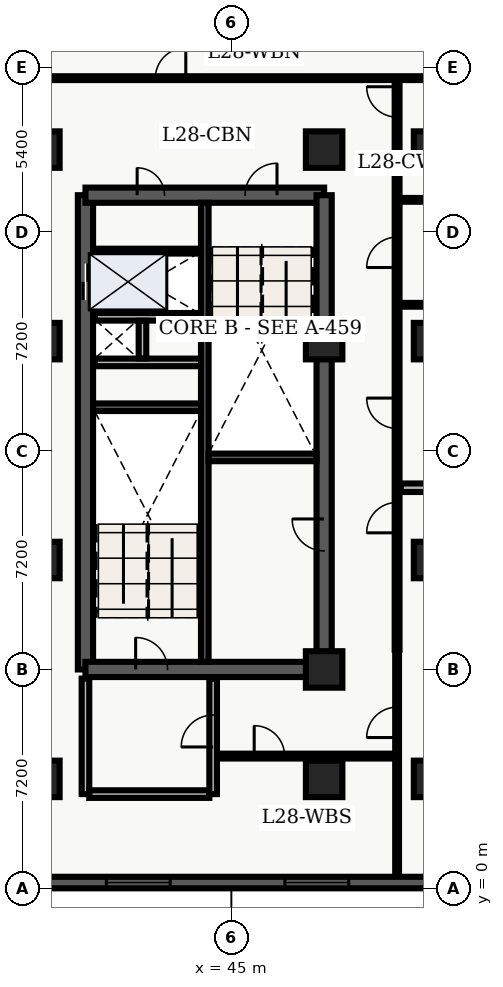
"""IFC4 building model, lengths in metres.
Left out: names, types, materials, properties, quantities, classifications, styles, units other than length and angle.
Written with IfcOpenShell. Run it as: python <this file> out.ifc"""

import sys

from ifc_helpers import new_model, entity, si_unit, converted_unit, direction, frame, origin_with_axes, origin_2d_with_axis, place, context, subcontext, project, spatial, polyline, rectangle, outline, extrude, element, fill, save


model = new_model("IFC4")
c1 = context("Model", 3, precision=1e-05, world=origin_with_axes(), true_north=direction((0.0, 1.0)))
c2 = subcontext(c1, "Body", "Model", "MODEL_VIEW")
j1 = project(units=[si_unit("LENGTHUNIT", "METRE"), converted_unit("PLANEANGLEUNIT", "DEGREE", entity("IfcPlaneAngleMeasure", 0.017), si_unit("PLANEANGLEUNIT", "RADIAN"), dimensions=[0, 0, 0, 0, 0, 0, 0])], contexts=[c1])
p1 = place(None, origin_with_axes())
s1 = spatial("IfcSite", under=j1, at=p1, CompositionType="ELEMENT")
p2 = place(p1, origin_with_axes())
s2 = spatial("IfcBuilding", under=s1, at=p2, CompositionType="ELEMENT")
p3 = place(p2, frame((0.0, 0.0, 116.4), z_axis=(0.0, 0.0, 1.0), x_axis=(1.0, 0.0, 0.0)))
s3 = spatial("IfcBuildingStorey", under=s2, at=p3, CompositionType="ELEMENT", Elevation=116.4)
p4 = place(p3, frame((40.2, 7.2, 0.0), z_axis=(0.0, 0.0, 1.0), x_axis=(0.0, 1.0, 0.0)))
e1 = element("IfcWall", 1, at=p4, inside=s3, PredefinedType="SHEAR", context=c2, shape_type="SweptSolid", body=[
    extrude(outline(polyline([(0.0, -0.25), (15.6, -0.25), (15.6, 0.25), (0.0, 0.25), (0.0, -0.25)])), origin_with_axes(), (0.0, 0.0, 1.0), 3.66),
])
p5 = place(p4, frame((12.75, 0.0, 0.0), z_axis=(0.0, 0.0, 1.0), x_axis=(1.0, 0.0, 0.0)))
e2 = element("IfcOpeningElement", 2, at=p5, cuts=e1, PredefinedType="OPENING", context=c2, shape_type="SweptSolid", body=[
    extrude(rectangle(XDim=1.2, YDim=0.52, at=origin_2d_with_axis()), origin_with_axes(), (0.0, 0.0, 1.0), 2.15),
])
p6 = place(p3, frame((40.2, 7.2, 0.0), z_axis=(0.0, 0.0, 1.0), x_axis=(1.0, 0.0, 0.0)))
e3 = element("IfcWall", 3, at=p6, inside=s3, PredefinedType="SHEAR", context=c2, shape_type="SweptSolid", body=[
    extrude(outline(polyline([(0.0, -0.25), (7.85, -0.25), (7.85, 0.25), (0.0, 0.25), (0.0, -0.25)])), origin_with_axes(), (0.0, 0.0, 1.0), 3.66),
])
p7 = place(p6, frame((2.175, 0.0, 0.0), z_axis=(0.0, 0.0, 1.0), x_axis=(1.0, 0.0, 0.0)))
e4 = element("IfcOpeningElement", 4, at=p7, cuts=e3, PredefinedType="OPENING", context=c2, shape_type="SweptSolid", body=[
    extrude(rectangle(XDim=1.05, YDim=0.52, at=origin_2d_with_axis()), origin_with_axes(), (0.0, 0.0, 1.0), 2.15),
])
p8 = place(p3, frame((40.2, 22.8, 0.0), z_axis=(0.0, 0.0, 1.0), x_axis=(1.0, 0.0, 0.0)))
e5 = element("IfcWall", 5, at=p8, inside=s3, PredefinedType="SHEAR", context=c2, shape_type="SweptSolid", body=[
    extrude(outline(polyline([(0.0, -0.25), (7.85, -0.25), (7.85, 0.25), (0.0, 0.25), (0.0, -0.25)])), origin_with_axes(), (0.0, 0.0, 1.0), 3.66),
])
p9 = place(p8, frame((5.775, 0.0, 0.0), z_axis=(0.0, 0.0, 1.0), x_axis=(1.0, 0.0, 0.0)))
e6 = element("IfcOpeningElement", 6, at=p9, cuts=e5, PredefinedType="OPENING", context=c2, shape_type="SweptSolid", body=[
    extrude(rectangle(XDim=1.05, YDim=0.52, at=origin_2d_with_axis()), origin_with_axes(), (0.0, 0.0, 1.0), 2.15),
])
p10 = place(p8, frame((2.15, 0.0, 0.0), z_axis=(0.0, 0.0, 1.0), x_axis=(1.0, 0.0, 0.0)))
e7 = element("IfcOpeningElement", 7, at=p10, cuts=e5, PredefinedType="OPENING", context=c2, shape_type="SweptSolid", body=[
    extrude(rectangle(XDim=0.9, YDim=0.52, at=origin_2d_with_axis()), origin_with_axes(), (0.0, 0.0, 1.0), 2.15),
])
p11 = place(p3, frame((48.05, 7.2, 0.0), z_axis=(0.0, 0.0, 1.0), x_axis=(0.0, 1.0, 0.0)))
e8 = element("IfcWall", 8, at=p11, inside=s3, PredefinedType="SHEAR", context=c2, shape_type="SweptSolid", body=[
    extrude(outline(polyline([(0.0, -0.25), (15.6, -0.25), (15.6, 0.25), (0.0, 0.25), (0.0, -0.25)])), origin_with_axes(), (0.0, 0.0, 1.0), 3.66),
])
p12 = place(p11, frame((4.425, 0.0, 0.0), z_axis=(0.0, 0.0, 1.0), x_axis=(1.0, 0.0, 0.0)))
e9 = element("IfcOpeningElement", 9, at=p12, cuts=e8, PredefinedType="OPENING", context=c2, shape_type="SweptSolid", body=[
    extrude(rectangle(XDim=1.05, YDim=0.52, at=origin_2d_with_axis()), origin_with_axes(), (0.0, 0.0, 1.0), 2.15),
])
p13 = place(p3, frame((44.125, 7.45, 0.0), z_axis=(0.0, 0.0, 1.0), x_axis=(0.0, 1.0, 0.0)))
e10 = element("IfcWall", 10, at=p13, inside=s3, PredefinedType="SHEAR", context=c2, shape_type="SweptSolid", body=[
    extrude(outline(polyline([(0.0, -0.125), (15.1, -0.125), (15.1, 0.125), (0.0, 0.125), (0.0, -0.125)])), origin_with_axes(), (0.0, 0.0, 1.0), 3.66),
])
for number, where, z_axis, x_axis in (
    (11, (40.45, 15.825, 0.0), (0.0, 0.0, 1.0), (1.0, 0.0, 0.0)),
    (12, (44.25, 14.175, 0.0), (0.0, 0.0, 1.0), (1.0, 0.0, 0.0)),
):
    element("IfcWall", number, at=place(p3, frame(where, z_axis=z_axis, x_axis=x_axis)), inside=s3, PredefinedType="SHEAR", context=c2, shape_type="SweptSolid", body=[
        extrude(outline(polyline([(0.0, -0.125), (3.55, -0.125), (3.55, 0.125), (0.0, 0.125), (0.0, -0.125)])), origin_with_axes(), (0.0, 0.0, 1.0), 3.66),
    ])
for number, where, z_axis, x_axis in (
    (13, (40.5, 17.3, 0.0), (0.0, 0.0, 1.0), (1.0, 0.0, 0.0)),
    (14, (40.5, 18.8, 0.0), (0.0, 0.0, 1.0), (1.0, 0.0, 0.0)),
):
    element("IfcWall", number, at=place(p3, frame(where, z_axis=z_axis, x_axis=x_axis)), inside=s3, PredefinedType="SOLIDWALL", context=c2, shape_type="SweptSolid", body=[
        extrude(outline(polyline([(0.0, -0.125), (3.5, -0.125), (3.5, 0.125), (0.0, 0.125), (0.0, -0.125)])), origin_with_axes(), (0.0, 0.0, 1.0), 2.7),
    ])
p14 = place(p3, frame((42.075, 17.43, 0.0), z_axis=(0.0, 0.0, 1.0), x_axis=(0.0, 1.0, 0.0)))
e15 = element("IfcWall", 15, at=p14, inside=s3, PredefinedType="SOLIDWALL", context=c2, shape_type="SweptSolid", body=[
    extrude(outline(polyline([(0.0, -0.125), (1.24, -0.125), (1.24, 0.125), (0.0, 0.125), (0.0, -0.125)])), origin_with_axes(), (0.0, 0.0, 1.0), 2.7),
])
p15 = place(p3, frame((40.2, 3.1, 0.0), z_axis=(0.0, 0.0, 1.0), x_axis=(0.0, 1.0, 0.0)))
e16 = element("IfcWall", 16, at=p15, inside=s3, PredefinedType="SOLIDWALL", context=c2, shape_type="SweptSolid", body=[
    extrude(outline(polyline([(0.0, -0.125), (3.8, -0.125), (3.8, 0.125), (0.0, 0.125), (0.0, -0.125)])), origin_with_axes(), (0.0, 0.0, 1.0), 2.7),
])
p16 = place(p3, frame((40.325, 3.1, 0.0), z_axis=(0.0, 0.0, 1.0), x_axis=(1.0, 0.0, 0.0)))
e17 = element("IfcWall", 17, at=p16, inside=s3, PredefinedType="SOLIDWALL", context=c2, shape_type="SweptSolid", body=[
    extrude(outline(polyline([(0.0, -0.125), (3.95, -0.125), (3.95, 0.125), (0.0, 0.125), (0.0, -0.125)])), origin_with_axes(), (0.0, 0.0, 1.0), 2.7),
])
p17 = place(p3, frame((44.4, 3.1, 0.0), z_axis=(0.0, 0.0, 1.0), x_axis=(0.0, 1.0, 0.0)))
e18 = element("IfcWall", 18, at=p17, inside=s3, PredefinedType="SOLIDWALL", context=c2, shape_type="SweptSolid", body=[
    extrude(outline(polyline([(0.0, -0.125), (3.8, -0.125), (3.8, 0.125), (0.0, 0.125), (0.0, -0.125)])), origin_with_axes(), (0.0, 0.0, 1.0), 2.7),
])
p18 = place(p17, frame((2.075, 0.0, 0.0), z_axis=(0.0, 0.0, 1.0), x_axis=(1.0, 0.0, 0.0)))
e19 = element("IfcOpeningElement", 19, at=p18, cuts=e18, PredefinedType="OPENING", context=c2, shape_type="SweptSolid", body=[
    extrude(rectangle(XDim=1.05, YDim=0.27, at=origin_2d_with_axis()), origin_with_axes(), (0.0, 0.0, 1.0), 2.15),
])
for number, where, z_axis, x_axis in (
    (20, (38.75, 3.6, 0.0), (0.0, 0.0, 1.0), (1.0, 0.0, 0.0)),
    (21, (38.75, 10.8, 0.0), (0.0, 0.0, 1.0), (1.0, 0.0, 0.0)),
    (22, (38.75, 18.0, 0.0), (0.0, 0.0, 1.0), (1.0, 0.0, 0.0)),
    (23, (38.75, 24.3, 0.0), (0.0, 0.0, 1.0), (1.0, 0.0, 0.0)),
    (24, (48.05, 3.6, 0.0), (0.0, 0.0, 1.0), (1.0, 0.0, 0.0)),
    (25, (48.05, 7.2, 0.0), (0.0, 0.0, 1.0), (1.0, 0.0, 0.0)),
    (26, (48.05, 18.0, 0.0), (0.0, 0.0, 1.0), (1.0, 0.0, 0.0)),
    (27, (48.05, 24.3, 0.0), (0.0, 0.0, 1.0), (1.0, 0.0, 0.0)),
    (28, (51.6, 3.6, 0.0), (0.0, 0.0, 1.0), (1.0, 0.0, 0.0)),
    (29, (51.6, 10.8, 0.0), (0.0, 0.0, 1.0), (1.0, 0.0, 0.0)),
    (30, (51.6, 18.0, 0.0), (0.0, 0.0, 1.0), (1.0, 0.0, 0.0)),
    (31, (51.6, 24.3, 0.0), (0.0, 0.0, 1.0), (1.0, 0.0, 0.0)),
):
    element("IfcColumn", number, at=place(p3, frame(where, z_axis=z_axis, x_axis=x_axis)), inside=s3, PredefinedType="COLUMN", context=c2, shape_type="SweptSolid", body=[
        extrude(rectangle(XDim=1.2, YDim=1.2, at=origin_2d_with_axis()), origin_with_axes(), (0.0, 0.0, 1.0), 3.9),
    ])
p19 = place(p3, frame((40.5, 20.96, 0.0), z_axis=(0.0, 0.0, 1.0), x_axis=(1.0, 0.0, 0.0)))
e32 = element("IfcWall", 32, at=p19, inside=s3, PredefinedType="PARTITIONING", context=c2, shape_type="SweptSolid", body=[
    extrude(outline(polyline([(0.0, -0.08), (3.5, -0.08), (3.5, 0.08), (0.0, 0.08), (0.0, -0.08)])), origin_with_axes(), (0.0, 0.0, 1.0), 2.7),
])
p20 = place(p3, frame((50.45, 7.85, 0.0), z_axis=(0.0, 0.0, 1.0), x_axis=(0.0, 1.0, 0.0)))
e33 = element("IfcWall", 33, at=p20, inside=s3, PredefinedType="PARTITIONING", context=c2, shape_type="SweptSolid", body=[
    extrude(outline(polyline([(0.0, -0.08), (18.8, -0.08), (18.8, 0.08), (0.0, 0.08), (0.0, -0.08)])), origin_with_axes(), (0.0, 0.0, 1.0), 2.7),
])
p21 = place(p20, frame((4.344, 0.0, 0.0), z_axis=(0.0, 0.0, 1.0), x_axis=(1.0, 0.0, 0.0)))
e34 = element("IfcOpeningElement", 34, at=p21, cuts=e33, PredefinedType="OPENING", context=c2, shape_type="SweptSolid", body=[
    extrude(rectangle(XDim=1.0, YDim=0.18, at=origin_2d_with_axis()), origin_with_axes(), (0.0, 0.0, 1.0), 2.15),
])
p22 = place(p20, frame((7.776, 0.0, 0.0), z_axis=(0.0, 0.0, 1.0), x_axis=(1.0, 0.0, 0.0)))
e35 = element("IfcOpeningElement", 35, at=p22, cuts=e33, PredefinedType="OPENING", context=c2, shape_type="SweptSolid", body=[
    extrude(rectangle(XDim=1.0, YDim=0.18, at=origin_2d_with_axis()), origin_with_axes(), (0.0, 0.0, 1.0), 2.15),
])
p23 = place(p20, frame((13.071, 0.0, 0.0), z_axis=(0.0, 0.0, 1.0), x_axis=(1.0, 0.0, 0.0)))
e36 = element("IfcOpeningElement", 36, at=p23, cuts=e33, PredefinedType="OPENING", context=c2, shape_type="SweptSolid", body=[
    extrude(rectangle(XDim=1.0, YDim=0.18, at=origin_2d_with_axis()), origin_with_axes(), (0.0, 0.0, 1.0), 2.15),
])
p24 = place(p20, frame((18.018, 0.0, 0.0), z_axis=(0.0, 0.0, 1.0), x_axis=(1.0, 0.0, 0.0)))
e37 = element("IfcOpeningElement", 37, at=p24, cuts=e33, PredefinedType="OPENING", context=c2, shape_type="SweptSolid", body=[
    extrude(rectangle(XDim=1.0, YDim=0.18, at=origin_2d_with_axis()), origin_with_axes(), (0.0, 0.0, 1.0), 2.15),
])
p25 = place(p3, frame((38.76, 26.65, 0.0), z_axis=(0.0, 0.0, 1.0), x_axis=(1.0, 0.0, 0.0)))
e38 = element("IfcWall", 38, at=p25, inside=s3, PredefinedType="PARTITIONING", context=c2, shape_type="SweptSolid", body=[
    extrude(outline(polyline([(0.0, -0.062), (20.88, -0.062), (20.88, 0.062), (0.0, 0.062), (0.0, -0.062)])), origin_with_axes(), (0.0, 0.0, 1.0), 2.7),
])
p26 = place(p25, frame((4.24, 0.0, 0.0), z_axis=(0.0, 0.0, 1.0), x_axis=(1.0, 0.0, 0.0)))
e39 = element("IfcOpeningElement", 39, at=p26, cuts=e38, PredefinedType="OPENING", context=c2, shape_type="SweptSolid", body=[
    extrude(rectangle(XDim=1.0, YDim=0.145, at=origin_2d_with_axis()), origin_with_axes(), (0.0, 0.0, 1.0), 2.15),
])
p27 = place(p3, frame((44.55, 4.35, 0.0), z_axis=(0.0, 0.0, 1.0), x_axis=(1.0, 0.0, 0.0)))
e40 = element("IfcWall", 40, at=p27, inside=s3, PredefinedType="PARTITIONING", context=c2, shape_type="SweptSolid", body=[
    extrude(outline(polyline([(0.0, -0.08), (5.9, -0.08), (5.9, 0.08), (0.0, 0.08), (0.0, -0.08)])), origin_with_axes(), (0.0, 0.0, 1.0), 2.7),
])
p28 = place(p27, frame((1.7, 0.0, 0.0), z_axis=(0.0, 0.0, 1.0), x_axis=(1.0, 0.0, 0.0)))
e41 = element("IfcOpeningElement", 41, at=p28, cuts=e40, PredefinedType="OPENING", context=c2, shape_type="SweptSolid", body=[
    extrude(rectangle(XDim=1.0, YDim=0.18, at=origin_2d_with_axis()), origin_with_axes(), (0.0, 0.0, 1.0), 2.15),
])
p29 = place(p3, frame((50.45, 0.36, 0.0), z_axis=(0.0, 0.0, 1.0), x_axis=(0.0, 1.0, 0.0)))
e42 = element("IfcWall", 42, at=p29, inside=s3, PredefinedType="PARTITIONING", context=c2, shape_type="SweptSolid", body=[
    extrude(outline(polyline([(0.0, -0.062), (7.49, -0.062), (7.49, 0.062), (0.0, 0.062), (0.0, -0.062)])), origin_with_axes(), (0.0, 0.0, 1.0), 2.7),
])
p30 = place(p29, frame((5.1, 0.0, 0.0), z_axis=(0.0, 0.0, 1.0), x_axis=(1.0, 0.0, 0.0)))
e43 = element("IfcOpeningElement", 43, at=p30, cuts=e42, PredefinedType="OPENING", context=c2, shape_type="SweptSolid", body=[
    extrude(rectangle(XDim=1.0, YDim=0.145, at=origin_2d_with_axis()), origin_with_axes(), (0.0, 0.0, 1.0), 2.15),
])
p31 = place(p3, frame((50.57, 13.177, 0.0), z_axis=(0.0, 0.0, 1.0), x_axis=(1.0, 0.0, 0.0)))
e44 = element("IfcWall", 44, at=p31, inside=s3, PredefinedType="PARTITIONING", context=c2, shape_type="SweptSolid", body=[
    extrude(outline(polyline([(0.0, -0.14), (9.055, -0.14), (9.055, 0.14), (0.0, 0.14), (0.0, -0.14)])), origin_with_axes(), (0.0, 0.0, 1.0), 2.7),
])
for number, where, z_axis, x_axis in (
    (45, (50.57, 19.195, 0.0), (0.0, 0.0, 1.0), (1.0, 0.0, 0.0)),
    (46, (50.57, 22.647, 0.0), (0.0, 0.0, 1.0), (1.0, 0.0, 0.0)),
):
    element("IfcWall", number, at=place(p3, frame(where, z_axis=z_axis, x_axis=x_axis)), inside=s3, PredefinedType="PARTITIONING", context=c2, shape_type="SweptSolid", body=[
        extrude(outline(polyline([(0.0, -0.062), (9.055, -0.062), (9.055, 0.062), (0.0, 0.062), (0.0, -0.062)])), origin_with_axes(), (0.0, 0.0, 1.0), 2.7),
    ])
p32 = place(p3, frame((57.22, 0.19, 0.0), z_axis=(0.0, 0.0, 1.0), x_axis=(-1.0, 0.0, 0.0)))
e47 = element("IfcWall", 47, at=p32, inside=s3, PredefinedType="SOLIDWALL", context=c2, shape_type="SweptSolid", body=[
    extrude(outline(polyline([(0.0, -0.19), (18.82, -0.19), (18.82, 0.19), (0.0, 0.19), (0.0, -0.19)])), origin_with_axes(), (0.0, 0.0, 1.0), 3.66),
])
p33 = place(p32, frame((3.537, 0.0, 0.45), z_axis=(0.0, 0.0, 1.0), x_axis=(1.0, 0.0, 0.0)))
e48 = element("IfcOpeningElement", 48, at=p33, cuts=e47, PredefinedType="OPENING", context=c2, shape_type="SweptSolid", body=[
    extrude(rectangle(XDim=2.1, YDim=0.4, at=origin_2d_with_axis()), origin_with_axes(), (0.0, 0.0, 1.0), 2.2),
])
p34 = place(p32, frame((9.41, 0.0, 0.45), z_axis=(0.0, 0.0, 1.0), x_axis=(1.0, 0.0, 0.0)))
e49 = element("IfcOpeningElement", 49, at=p34, cuts=e47, PredefinedType="OPENING", context=c2, shape_type="SweptSolid", body=[
    extrude(rectangle(XDim=2.1, YDim=0.4, at=origin_2d_with_axis()), origin_with_axes(), (0.0, 0.0, 1.0), 2.2),
])
p35 = place(p32, frame((15.283, 0.0, 0.45), z_axis=(0.0, 0.0, 1.0), x_axis=(1.0, 0.0, 0.0)))
e50 = element("IfcOpeningElement", 50, at=p35, cuts=e47, PredefinedType="OPENING", context=c2, shape_type="SweptSolid", body=[
    extrude(rectangle(XDim=2.1, YDim=0.4, at=origin_2d_with_axis()), origin_with_axes(), (0.0, 0.0, 1.0), 2.2),
])
p36 = place(p4, frame((12.75, 0.0, 0.0), z_axis=(0.0, 0.0, 1.0), x_axis=(1.0, 0.0, 0.0)))
e51 = element("IfcDoor", 51, at=p36, inside=s3, OperationType="DOUBLE_DOOR_SLIDING", PredefinedType="DOOR", context=c2, shape_type="SweptSolid", body=[
    extrude(rectangle(XDim=1.2, YDim=0.09, at=origin_2d_with_axis()), origin_with_axes(), (0.0, 0.0, 1.0), 2.15),
])
fill(e2, e51)
p37 = place(p6, frame((2.175, 0.0, 0.0), z_axis=(0.0, 0.0, 1.0), x_axis=(1.0, 0.0, 0.0)))
e52 = element("IfcDoor", 52, at=p37, inside=s3, OperationType="SINGLE_SWING_LEFT", PredefinedType="DOOR", context=c2, shape_type="SweptSolid", body=[
    extrude(rectangle(XDim=1.05, YDim=0.09, at=origin_2d_with_axis()), origin_with_axes(), (0.0, 0.0, 1.0), 2.15),
])
fill(e4, e52)
p38 = place(p8, frame((5.775, 0.0, 0.0), z_axis=(0.0, 0.0, 1.0), x_axis=(1.0, 0.0, 0.0)))
e53 = element("IfcDoor", 53, at=p38, inside=s3, OperationType="SINGLE_SWING_RIGHT", PredefinedType="DOOR", context=c2, shape_type="SweptSolid", body=[
    extrude(rectangle(XDim=1.05, YDim=0.09, at=origin_2d_with_axis()), origin_with_axes(), (0.0, 0.0, 1.0), 2.15),
])
fill(e6, e53)
p39 = place(p17, frame((2.075, 0.0, 0.0), z_axis=(0.0, 0.0, 1.0), x_axis=(1.0, 0.0, 0.0)))
e54 = element("IfcDoor", 54, at=p39, inside=s3, OperationType="SINGLE_SWING_LEFT", PredefinedType="DOOR", context=c2, shape_type="SweptSolid", body=[
    extrude(rectangle(XDim=1.05, YDim=0.09, at=origin_2d_with_axis()), origin_with_axes(), (0.0, 0.0, 1.0), 2.15),
])
fill(e19, e54)
p40 = place(p8, frame((2.15, 0.0, 0.0), z_axis=(0.0, 0.0, 1.0), x_axis=(1.0, 0.0, 0.0)))
e55 = element("IfcDoor", 55, at=p40, inside=s3, OperationType="SINGLE_SWING_LEFT", PredefinedType="DOOR", context=c2, shape_type="SweptSolid", body=[
    extrude(rectangle(XDim=0.9, YDim=0.09, at=origin_2d_with_axis()), origin_with_axes(), (0.0, 0.0, 1.0), 2.15),
])
fill(e7, e55)
p41 = place(p11, frame((4.425, 0.0, 0.0), z_axis=(0.0, 0.0, 1.0), x_axis=(1.0, 0.0, 0.0)))
e56 = element("IfcDoor", 56, at=p41, inside=s3, OperationType="SINGLE_SWING_RIGHT", PredefinedType="DOOR", context=c2, shape_type="SweptSolid", body=[
    extrude(rectangle(XDim=1.05, YDim=0.09, at=origin_2d_with_axis()), origin_with_axes(), (0.0, 0.0, 1.0), 2.15),
])
fill(e9, e56)
p42 = place(p27, frame((1.7, 0.0, 0.0), z_axis=(0.0, 0.0, 1.0), x_axis=(1.0, 0.0, 0.0)))
e57 = element("IfcDoor", 57, at=p42, inside=s3, OperationType="SINGLE_SWING_LEFT", PredefinedType="DOOR", context=c2, shape_type="SweptSolid", body=[
    extrude(rectangle(XDim=1.0, YDim=0.09, at=origin_2d_with_axis()), origin_with_axes(), (0.0, 0.0, 1.0), 2.15),
])
fill(e41, e57)
p43 = place(p29, frame((5.1, 0.0, 0.0), z_axis=(0.0, 0.0, 1.0), x_axis=(1.0, 0.0, 0.0)))
e58 = element("IfcDoor", 58, at=p43, inside=s3, OperationType="SINGLE_SWING_LEFT", PredefinedType="DOOR", context=c2, shape_type="SweptSolid", body=[
    extrude(rectangle(XDim=1.0, YDim=0.075, at=origin_2d_with_axis()), origin_with_axes(), (0.0, 0.0, 1.0), 2.15),
])
fill(e43, e58)
p44 = place(p25, frame((4.24, 0.0, 0.0), z_axis=(0.0, 0.0, 1.0), x_axis=(1.0, 0.0, 0.0)))
e59 = element("IfcDoor", 59, at=p44, inside=s3, OperationType="SINGLE_SWING_RIGHT", PredefinedType="DOOR", context=c2, shape_type="SweptSolid", body=[
    extrude(rectangle(XDim=1.0, YDim=0.075, at=origin_2d_with_axis()), origin_with_axes(), (0.0, 0.0, 1.0), 2.15),
])
fill(e39, e59)
p45 = place(p20, frame((4.344, 0.0, 0.0), z_axis=(0.0, 0.0, 1.0), x_axis=(1.0, 0.0, 0.0)))
e60 = element("IfcDoor", 60, at=p45, inside=s3, OperationType="SINGLE_SWING_LEFT", PredefinedType="DOOR", context=c2, shape_type="SweptSolid", body=[
    extrude(rectangle(XDim=1.0, YDim=0.09, at=origin_2d_with_axis()), origin_with_axes(), (0.0, 0.0, 1.0), 2.15),
])
fill(e34, e60)
p46 = place(p20, frame((7.776, 0.0, 0.0), z_axis=(0.0, 0.0, 1.0), x_axis=(1.0, 0.0, 0.0)))
e61 = element("IfcDoor", 61, at=p46, inside=s3, OperationType="SINGLE_SWING_RIGHT", PredefinedType="DOOR", context=c2, shape_type="SweptSolid", body=[
    extrude(rectangle(XDim=1.0, YDim=0.09, at=origin_2d_with_axis()), origin_with_axes(), (0.0, 0.0, 1.0), 2.15),
])
fill(e35, e61)
p47 = place(p20, frame((13.071, 0.0, 0.0), z_axis=(0.0, 0.0, 1.0), x_axis=(1.0, 0.0, 0.0)))
e62 = element("IfcDoor", 62, at=p47, inside=s3, OperationType="SINGLE_SWING_LEFT", PredefinedType="DOOR", context=c2, shape_type="SweptSolid", body=[
    extrude(rectangle(XDim=1.0, YDim=0.09, at=origin_2d_with_axis()), origin_with_axes(), (0.0, 0.0, 1.0), 2.15),
])
fill(e36, e62)
p48 = place(p20, frame((18.018, 0.0, 0.0), z_axis=(0.0, 0.0, 1.0), x_axis=(1.0, 0.0, 0.0)))
e63 = element("IfcDoor", 63, at=p48, inside=s3, OperationType="SINGLE_SWING_RIGHT", PredefinedType="DOOR", context=c2, shape_type="SweptSolid", body=[
    extrude(rectangle(XDim=1.0, YDim=0.09, at=origin_2d_with_axis()), origin_with_axes(), (0.0, 0.0, 1.0), 2.15),
])
fill(e37, e63)
p49 = place(p32, frame((9.41, 0.0, 0.45), z_axis=(0.0, 0.0, 1.0), x_axis=(1.0, 0.0, 0.0)))
e64 = element("IfcWindow", 64, at=p49, inside=s3, PredefinedType="WINDOW", context=c2, shape_type="SweptSolid", body=[
    extrude(rectangle(XDim=2.1, YDim=0.09, at=origin_2d_with_axis()), origin_with_axes(), (0.0, 0.0, 1.0), 2.2),
])
fill(e49, e64)
p50 = place(p32, frame((15.283, 0.0, 0.45), z_axis=(0.0, 0.0, 1.0), x_axis=(1.0, 0.0, 0.0)))
e65 = element("IfcWindow", 65, at=p50, inside=s3, PredefinedType="WINDOW", context=c2, shape_type="SweptSolid", body=[
    extrude(rectangle(XDim=2.1, YDim=0.09, at=origin_2d_with_axis()), origin_with_axes(), (0.0, 0.0, 1.0), 2.2),
])
fill(e50, e65)
save(model, sys.argv[1])
